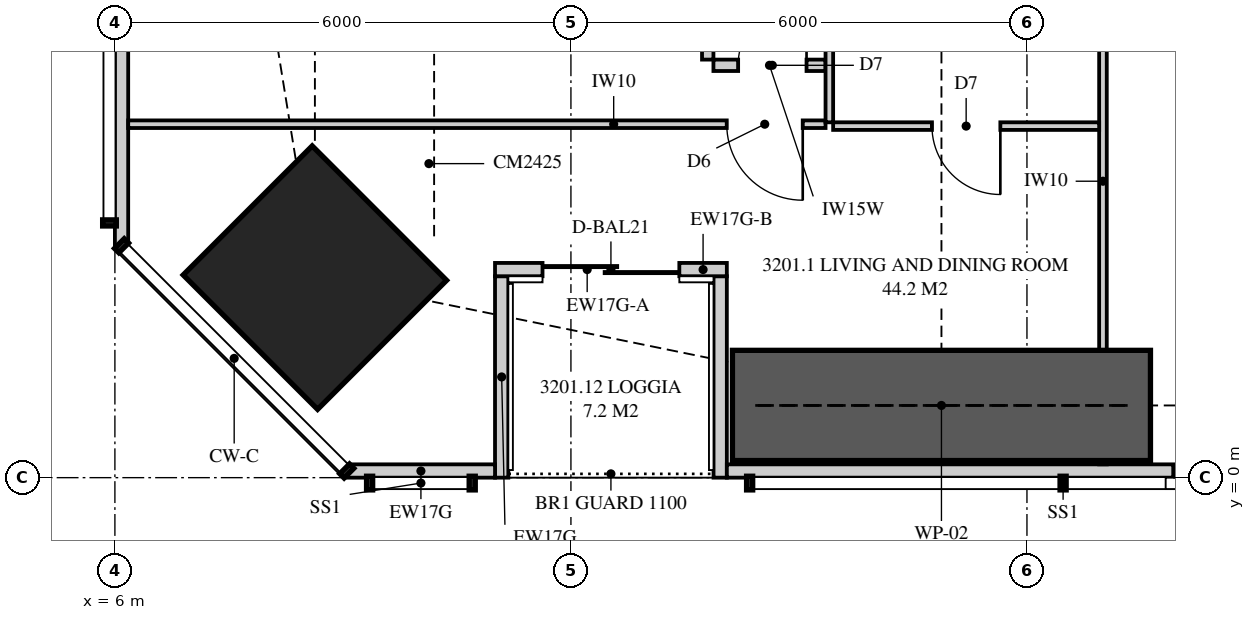
"""IFC4 building model, lengths in metres.
Left out: names, types, materials, properties, quantities, classifications, styles, units other than length and angle.
Written with IfcOpenShell. Run it as: python <this file> out.ifc"""

import sys

from ifc_helpers import new_model, si_unit, direction, frame, frame_2d, origin, origin_2d, place, context, subcontext, project, spatial, polyline, rectangle, outline, extrude, element, fill, save


model = new_model("IFC4")
c1 = context("Model", 3, precision=1e-05, world=origin(), true_north=direction((0.0, 1.0)))
c2 = subcontext(c1, "Body", "Model", "MODEL_VIEW")
j1 = project(units=[si_unit("LENGTHUNIT", "METRE"), si_unit("PLANEANGLEUNIT", "RADIAN")], contexts=[c1])
p1 = place(None, origin())
s1 = spatial("IfcSite", under=j1, at=p1, CompositionType="ELEMENT")
p2 = place(p1, origin())
s2 = spatial("IfcBuilding", under=s1, at=p2, CompositionType="ELEMENT")
p3 = place(p2, frame((0.0, 0.0, 118.25)))
s3 = spatial("IfcBuildingStorey", under=s2, at=p3, CompositionType="ELEMENT", Elevation=118.25)
p4 = place(p3, frame((8.631, 2.631, 0.0), z_axis=(0.0, 0.0, 1.0), x_axis=(0.707106781187, 0.707106781187, 0.0)))
e1 = element("IfcColumn", 1, at=p4, inside=s3, PredefinedType="COLUMN", context=c2, shape_type="SweptSolid", body=[
    extrude(rectangle(XDim=2.4, YDim=2.5, at=origin_2d()), origin(), (0.0, 0.0, 1.0), 3.35),
])
p5 = place(p3, frame((9.051, 0.087, 0.0), z_axis=(0.0, 0.0, 1.0), x_axis=(1.0, 0.0, 0.0)))
e2 = element("IfcWall", 2, at=p5, inside=s3, PredefinedType="SOLIDWALL", context=c2, shape_type="SweptSolid", body=[
    extrude(rectangle(XDim=1.95, YDim=0.175, at=frame_2d((0.975, 0.0))), origin(), (0.0, 0.0, 1.0), 3.11),
])
p6 = place(p3, frame((14.051, 0.087, 0.0), z_axis=(0.0, 0.0, 1.0), x_axis=(1.0, 0.0, 0.0)))
e3 = element("IfcWall", 3, at=p6, inside=s3, PredefinedType="SOLIDWALL", context=c2, shape_type="SweptSolid", body=[
    extrude(outline(polyline([(0.0, 0.0), (27.374, 0.0), (27.374, 3.11), (24.777, 3.11), (24.777, 2.15), (24.732, 2.15), (24.732, 3.11), (24.574, 3.11), (24.574, 2.15), (2.824, 2.15), (2.824, 3.11), (2.666, 3.11), (2.666, 2.15), (2.62, 2.15), (2.62, 3.11), (0.0, 3.11), (0.0, 0.0)])), frame((0.0, 0.087, 0.0), z_axis=(0.0, -1.0, 0.0), x_axis=(1.0, 0.0, 0.0)), (0.0, 0.0, 1.0), 0.175),
])
p7 = place(p6, frame((5.874, 0.0, 0.4)))
e4 = element("IfcOpeningElement", 4, at=p7, cuts=e3, PredefinedType="OPENING", context=c2, shape_type="SweptSolid", body=[
    extrude(rectangle(XDim=1.8, YDim=1.7, at=frame_2d((0.9, 0.85))), frame((0.0, 0.097, 0.0), z_axis=(0.0, -1.0, 0.0), x_axis=(1.0, 0.0, 0.0)), (0.0, 0.0, 1.0), 0.195),
])
p8 = place(p6, frame((9.04, 0.0, 0.4)))
e5 = element("IfcOpeningElement", 5, at=p8, cuts=e3, PredefinedType="OPENING", context=c2, shape_type="SweptSolid", body=[
    extrude(rectangle(XDim=1.8, YDim=1.7, at=frame_2d((0.9, 0.85))), frame((0.0, 0.097, 0.0), z_axis=(0.0, -1.0, 0.0), x_axis=(1.0, 0.0, 0.0)), (0.0, 0.0, 1.0), 0.195),
])
p9 = place(p6, frame((16.564, 0.0, 0.4)))
e6 = element("IfcOpeningElement", 6, at=p9, cuts=e3, PredefinedType="OPENING", context=c2, shape_type="SweptSolid", body=[
    extrude(rectangle(XDim=1.8, YDim=1.7, at=frame_2d((0.9, 0.85))), frame((0.0, 0.097, 0.0), z_axis=(0.0, -1.0, 0.0), x_axis=(1.0, 0.0, 0.0)), (0.0, 0.0, 1.0), 0.195),
])
p10 = place(p6, frame((19.889, 0.0, 0.4)))
e7 = element("IfcOpeningElement", 7, at=p10, cuts=e3, PredefinedType="OPENING", context=c2, shape_type="SweptSolid", body=[
    extrude(rectangle(XDim=1.8, YDim=1.7, at=frame_2d((0.9, 0.85))), frame((0.0, 0.097, 0.0), z_axis=(0.0, -1.0, 0.0), x_axis=(1.0, 0.0, 0.0)), (0.0, 0.0, 1.0), 0.195),
])
p11 = place(p3, frame((11.001, 2.738, 0.0), z_axis=(0.0, 0.0, 1.0), x_axis=(1.0, 0.0, 0.0)))
e8 = element("IfcWall", 8, at=p11, inside=s3, PredefinedType="SOLIDWALL", context=c2, shape_type="SweptSolid", body=[
    extrude(rectangle(XDim=2.425, YDim=0.175, at=frame_2d((1.212, 0.0))), origin(), (0.0, 0.0, 1.0), 2.15),
])
p12 = place(p11, frame((0.625, 0.0, 0.0)))
e9 = element("IfcOpeningElement", 9, at=p12, cuts=e8, PredefinedType="OPENING", context=c2, shape_type="SweptSolid", body=[
    extrude(rectangle(XDim=1.8, YDim=2.1, at=frame_2d((0.9, 1.05))), frame((0.0, 0.097, 0.0), z_axis=(0.0, -1.0, 0.0), x_axis=(1.0, 0.0, 0.0)), (0.0, 0.0, 1.0), 0.195),
])
p13 = place(p3, frame((13.426, 2.738, 0.0), z_axis=(0.0, 0.0, 1.0), x_axis=(1.0, 0.0, 0.0)))
e10 = element("IfcWall", 10, at=p13, inside=s3, PredefinedType="SOLIDWALL", context=c2, shape_type="SweptSolid", body=[
    extrude(rectangle(XDim=0.625, YDim=0.175, at=frame_2d((0.312, 0.0))), origin(), (0.0, 0.0, 1.0), 3.11),
])
p14 = place(p3, frame((11.089, 0.0, 0.0), z_axis=(0.0, 0.0, 1.0), x_axis=(0.0, 1.0, 0.0)))
e11 = element("IfcWall", 11, at=p14, inside=s3, PredefinedType="SOLIDWALL", context=c2, shape_type="SweptSolid", body=[
    extrude(outline(polyline([(0.0, 0.0), (2.65, 0.0), (2.65, 2.15), (1.296, 2.15), (1.296, 3.11), (0.0, 3.11), (0.0, 0.0)])), frame((0.0, 0.087, 0.0), z_axis=(0.0, -1.0, 0.0), x_axis=(1.0, 0.0, 0.0)), (0.0, 0.0, 1.0), 0.175),
])
p15 = place(p3, frame((13.964, 0.0, 0.0), z_axis=(0.0, 0.0, 1.0), x_axis=(0.0, 1.0, 0.0)))
e12 = element("IfcWall", 12, at=p15, inside=s3, PredefinedType="SOLIDWALL", context=c2, shape_type="SweptSolid", body=[
    extrude(outline(polyline([(0.0, 0.0), (2.65, 0.0), (2.65, 3.11), (2.378, 3.11), (2.378, 2.15), (0.709, 2.15), (0.709, 3.11), (0.0, 3.11), (0.0, 0.0)])), frame((0.0, 0.087, 0.0), z_axis=(0.0, -1.0, 0.0), x_axis=(1.0, 0.0, 0.0)), (0.0, 0.0, 1.0), 0.175),
])
p16 = place(p3, frame((6.087, 17.358, 0.0), z_axis=(0.0, 0.0, 1.0), x_axis=(0.0, -1.0, 0.0)))
e13 = element("IfcWall", 13, at=p16, inside=s3, PredefinedType="SOLIDWALL", context=c2, shape_type="SweptSolid", body=[
    extrude(outline(polyline([(0.0, 0.0), (14.307, 0.0), (14.307, 3.11), (4.577, 3.11), (4.577, 2.15), (4.484, 2.15), (4.484, 3.11), (4.358, 3.11), (4.358, 2.15), (0.0, 2.15), (0.0, 0.0)])), frame((0.0, 0.087, 0.0), z_axis=(0.0, -1.0, 0.0), x_axis=(1.0, 0.0, 0.0)), (0.0, 0.0, 1.0), 0.175),
])
p17 = place(p16, frame((0.3, 0.0, 0.4)))
e14 = element("IfcOpeningElement", 14, at=p17, cuts=e13, PredefinedType="OPENING", context=c2, shape_type="SweptSolid", body=[
    extrude(rectangle(XDim=1.2, YDim=1.7, at=frame_2d((0.6, 0.85))), frame((0.0, 0.097, 0.0), z_axis=(0.0, -1.0, 0.0), x_axis=(1.0, 0.0, 0.0)), (0.0, 0.0, 1.0), 0.195),
])
p18 = place(p16, frame((7.233, 0.0, 0.4)))
e15 = element("IfcOpeningElement", 15, at=p18, cuts=e13, PredefinedType="OPENING", context=c2, shape_type="SweptSolid", body=[
    extrude(rectangle(XDim=1.8, YDim=1.7, at=frame_2d((0.9, 0.85))), frame((0.0, 0.097, 0.0), z_axis=(0.0, -1.0, 0.0), x_axis=(1.0, 0.0, 0.0)), (0.0, 0.0, 1.0), 0.195),
])
p19 = place(p3, frame((19.0, 0.175, 0.0), z_axis=(0.0, 0.0, 1.0), x_axis=(0.0, 1.0, 0.0)))
e16 = element("IfcWall", 16, at=p19, inside=s3, PredefinedType="PARTITIONING", context=c2, shape_type="SweptSolid", body=[
    extrude(outline(polyline([(0.529, 2.15), (0.0, 2.15), (0.0, 0.0), (0.529, 0.0), (0.529, 0.017), (1.021, 0.017), (1.021, 0.0), (7.45, 0.0), (7.45, 3.11), (1.635, 3.11), (1.635, 2.15), (1.021, 2.15), (1.021, 2.133), (0.529, 2.133), (0.529, 2.15)])), frame((0.0, 0.05, 0.0), z_axis=(0.0, -1.0, 0.0), x_axis=(1.0, 0.0, 0.0)), (0.0, 0.0, 1.0), 0.1),
])
p20 = place(p19, frame((6.1, 0.0, 0.0)))
e17 = element("IfcOpeningElement", 17, at=p20, cuts=e16, PredefinedType="OPENING", context=c2, shape_type="SweptSolid", body=[
    extrude(rectangle(XDim=0.9, YDim=2.1, at=frame_2d((0.45, 1.05))), frame((0.0, 0.06, 0.0), z_axis=(0.0, -1.0, 0.0), x_axis=(1.0, 0.0, 0.0)), (0.0, 0.0, 1.0), 0.12),
])
p21 = place(p3, frame((15.45, 4.625, 0.0), z_axis=(0.0, 0.0, 1.0), x_axis=(1.0, 0.0, 0.0)))
e18 = element("IfcWall", 18, at=p21, inside=s3, PredefinedType="PARTITIONING", context=c2, shape_type="SweptSolid", body=[
    extrude(outline(polyline([(0.0, 0.0), (3.5, 0.0), (3.5, 3.11), (1.712, 3.11), (1.712, 2.541), (1.138, 2.541), (1.138, 3.11), (0.0, 3.11), (0.0, 0.0)])), frame((0.0, 0.05, 0.0), z_axis=(0.0, -1.0, 0.0), x_axis=(1.0, 0.0, 0.0)), (0.0, 0.0, 1.0), 0.1),
])
p22 = place(p21, frame((1.3, 0.0, 0.0)))
e19 = element("IfcOpeningElement", 19, at=p22, cuts=e18, PredefinedType="OPENING", context=c2, shape_type="SweptSolid", body=[
    extrude(rectangle(XDim=0.9, YDim=2.1, at=frame_2d((0.45, 1.05))), frame((0.0, 0.06, 0.0), z_axis=(0.0, -1.0, 0.0), x_axis=(1.0, 0.0, 0.0)), (0.0, 0.0, 1.0), 0.12),
])
p23 = place(p3, frame((15.4, 4.675, 0.0), z_axis=(0.0, 0.0, 1.0), x_axis=(0.0, 1.0, 0.0)))
e20 = element("IfcWall", 20, at=p23, inside=s3, PredefinedType="PARTITIONING", context=c2, shape_type="SweptSolid", body=[
    extrude(rectangle(XDim=2.95, YDim=0.1, at=frame_2d((1.475, 0.0))), origin(), (0.0, 0.0, 1.0), 3.11),
])
p24 = place(p3, frame((13.875, 5.425, 0.0), z_axis=(0.0, 0.0, 1.0), x_axis=(1.0, 0.0, 0.0)))
e21 = element("IfcWall", 21, at=p24, inside=s3, PredefinedType="PLUMBINGWALL", context=c2, shape_type="SweptSolid", body=[
    extrude(rectangle(XDim=1.475, YDim=0.15, at=frame_2d((0.738, 0.0))), origin(), (0.0, 0.0, 1.0), 3.11),
])
p25 = place(p24, frame((0.325, 0.0, 0.0)))
e22 = element("IfcOpeningElement", 22, at=p25, cuts=e21, PredefinedType="OPENING", context=c2, shape_type="SweptSolid", body=[
    extrude(rectangle(XDim=0.9, YDim=2.1, at=frame_2d((0.45, 1.05))), frame((0.0, 0.085, 0.0), z_axis=(0.0, -1.0, 0.0), x_axis=(1.0, 0.0, 0.0)), (0.0, 0.0, 1.0), 0.17),
])
p26 = place(p3, frame((13.8, 5.5, 0.0), z_axis=(0.0, 0.0, 1.0), x_axis=(0.0, 1.0, 0.0)))
e23 = element("IfcWall", 23, at=p26, inside=s3, PredefinedType="PLUMBINGWALL", context=c2, shape_type="SweptSolid", body=[
    extrude(rectangle(XDim=2.125, YDim=0.15, at=frame_2d((1.062, 0.0))), origin(), (0.0, 0.0, 1.0), 3.11),
])
p27 = place(p3, frame((6.175, 4.65, 0.0), z_axis=(0.0, 0.0, 1.0), x_axis=(1.0, 0.0, 0.0)))
e24 = element("IfcWall", 24, at=p27, inside=s3, PredefinedType="PARTITIONING", context=c2, shape_type="SweptSolid", body=[
    extrude(outline(polyline([(0.0, 0.0), (9.175, 0.0), (9.175, 3.11), (5.285, 3.11), (5.285, 2.51), (3.0, 2.51), (3.0, 2.15), (1.258, 2.15), (1.258, 3.11), (0.0, 3.11), (0.0, 0.0)])), frame((0.0, 0.05, 0.0), z_axis=(0.0, -1.0, 0.0), x_axis=(1.0, 0.0, 0.0)), (0.0, 0.0, 1.0), 0.1),
])
p28 = place(p27, frame((7.875, 0.0, 0.0)))
e25 = element("IfcOpeningElement", 25, at=p28, cuts=e24, PredefinedType="OPENING", context=c2, shape_type="SweptSolid", body=[
    extrude(rectangle(XDim=1.0, YDim=2.1, at=frame_2d((0.5, 1.05))), frame((0.0, 0.06, 0.0), z_axis=(0.0, -1.0, 0.0), x_axis=(1.0, 0.0, 0.0)), (0.0, 0.0, 1.0), 0.12),
])
p29 = place(p3, frame((14.125, 0.95, 0.0), z_axis=(0.0, 0.0, 1.0), x_axis=(1.0, 0.0, 0.0)))
e26 = element("IfcWall", 26, at=p29, inside=s3, PredefinedType="SHEAR", context=c2, shape_type="SweptSolid", body=[
    extrude(rectangle(XDim=5.5, YDim=1.45, at=frame_2d((2.75, 0.0))), origin(), (0.0, 0.0, 1.0), 3.35),
])
p30 = place(p12, origin())
e27 = element("IfcDoor", 27, at=p30, inside=s3, OperationType="SLIDING_TO_LEFT", PredefinedType="DOOR", context=c2, shape_type="SweptSolid", body=[
    extrude(rectangle(XDim=1.8, YDim=2.1, at=frame_2d((0.9, 1.05))), frame((0.0, 0.025, 0.0), z_axis=(0.0, -1.0, 0.0), x_axis=(1.0, 0.0, 0.0)), (0.0, 0.0, 1.0), 0.05),
])
fill(e9, e27)
p31 = place(p7, origin())
e28 = element("IfcWindow", 28, at=p31, inside=s3, PartitioningType="SINGLE_PANEL", PredefinedType="WINDOW", context=c2, shape_type="SweptSolid", body=[
    extrude(rectangle(XDim=1.8, YDim=1.7, at=frame_2d((0.9, 0.85))), frame((0.0, 0.03, 0.0), z_axis=(0.0, -1.0, 0.0), x_axis=(1.0, 0.0, 0.0)), (0.0, 0.0, 1.0), 0.06),
])
fill(e4, e28)
p32 = place(p22, frame((0.9, 0.0, 0.0), z_axis=(0.0, 0.0, 1.0), x_axis=(-1.0, 0.0, 0.0)))
e29 = element("IfcDoor", 29, at=p32, inside=s3, OperationType="SINGLE_SWING_LEFT", PredefinedType="DOOR", context=c2, shape_type="SweptSolid", body=[
    extrude(rectangle(XDim=0.9, YDim=2.1, at=frame_2d((0.45, 1.05))), frame((0.0, 0.025, 0.0), z_axis=(0.0, -1.0, 0.0), x_axis=(1.0, 0.0, 0.0)), (0.0, 0.0, 1.0), 0.05),
])
fill(e19, e29)
p33 = place(p25, origin())
e30 = element("IfcDoor", 30, at=p33, inside=s3, OperationType="SINGLE_SWING_RIGHT", PredefinedType="DOOR", context=c2, shape_type="SweptSolid", body=[
    extrude(rectangle(XDim=0.9, YDim=2.1, at=frame_2d((0.45, 1.05))), frame((0.0, 0.025, 0.0), z_axis=(0.0, -1.0, 0.0), x_axis=(1.0, 0.0, 0.0)), (0.0, 0.0, 1.0), 0.05),
])
fill(e22, e30)
p34 = place(p28, frame((1.0, 0.0, 0.0), z_axis=(0.0, 0.0, 1.0), x_axis=(-1.0, 0.0, 0.0)))
e31 = element("IfcDoor", 31, at=p34, inside=s3, OperationType="SINGLE_SWING_LEFT", PredefinedType="DOOR", context=c2, shape_type="SweptSolid", body=[
    extrude(rectangle(XDim=1.0, YDim=2.1, at=frame_2d((0.5, 1.05))), frame((0.0, 0.025, 0.0), z_axis=(0.0, -1.0, 0.0), x_axis=(1.0, 0.0, 0.0)), (0.0, 0.0, 1.0), 0.05),
])
fill(e25, e31)
save(model, sys.argv[1])
